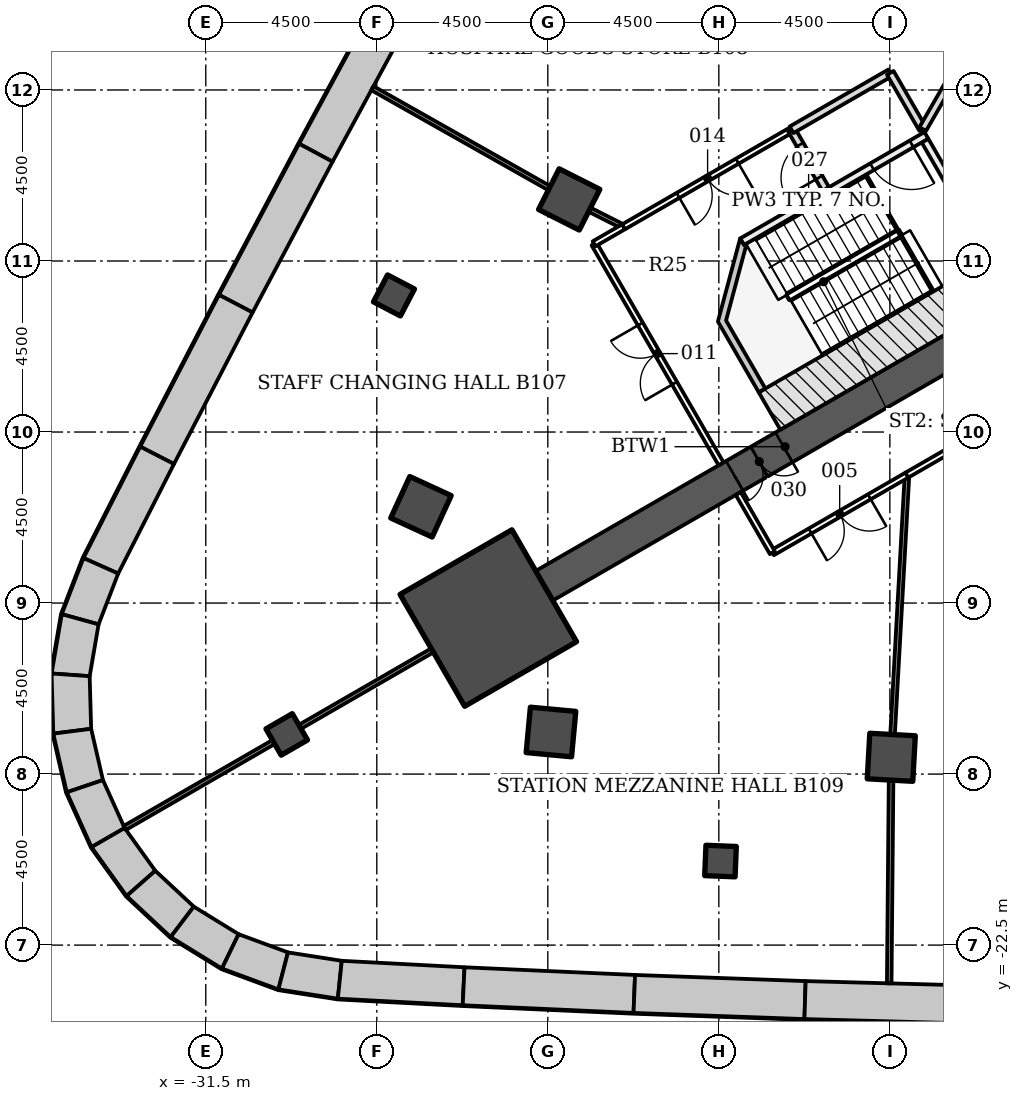
"""IFC4 building model, lengths in metres.
Left out: names, types, materials, properties, quantities, classifications, styles, units other than length and angle.
Written with IfcOpenShell. Run it as: python <this file> out.ifc"""

import sys

from ifc_helpers import new_model, si_unit, direction, frame, frame_2d, origin, origin_2d, place, context, subcontext, project, spatial, polyline, rectangle, outline, extrude, element, fill, save


model = new_model("IFC4")
c1 = context("Model", 3, precision=1e-05, world=origin(), true_north=direction((0.0, 1.0)))
c2 = subcontext(c1, "Body", "Model", "MODEL_VIEW")
j1 = project(units=[si_unit("LENGTHUNIT", "METRE"), si_unit("PLANEANGLEUNIT", "RADIAN")], contexts=[c1])
p1 = place(None, origin())
s1 = spatial("IfcSite", under=j1, at=p1, CompositionType="ELEMENT")
p2 = place(p1, origin())
s2 = spatial("IfcBuilding", under=s1, at=p2, CompositionType="ELEMENT")
p3 = place(p2, frame((0.0, 0.0, -4.5)))
s3 = spatial("IfcBuildingStorey", under=s2, at=p3, CompositionType="ELEMENT", Elevation=-4.5)
p4 = place(p3, origin())
e1 = element("IfcWall", 1, at=p4, inside=s3, PredefinedType="SOLIDWALL", context=c2, shape_type="SweptSolid", body=[
    extrude(outline(polyline([(-26.901, 2.542), (-29.045, -1.415), (-28.164, -1.887), (-26.024, 2.062), (-26.901, 2.542)])), origin(), (0.0, 0.0, 1.0), 4.25),
])
p5 = place(p3, origin())
e2 = element("IfcWall", 2, at=p5, inside=s3, PredefinedType="SOLIDWALL", context=c2, shape_type="SweptSolid", body=[
    extrude(outline(polyline([(-29.045, -1.415), (-31.153, -5.39), (-30.268, -5.854), (-28.164, -1.887), (-29.045, -1.415)])), origin(), (0.0, 0.0, 1.0), 4.25),
])
p6 = place(p3, origin())
e3 = element("IfcWall", 3, at=p6, inside=s3, PredefinedType="SOLIDWALL", context=c2, shape_type="SweptSolid", body=[
    extrude(outline(polyline([(-31.153, -5.39), (-33.226, -9.384), (-32.337, -9.841), (-30.268, -5.854), (-31.153, -5.39)])), origin(), (0.0, 0.0, 1.0), 4.25),
])
p7 = place(p3, origin())
e4 = element("IfcWall", 4, at=p7, inside=s3, PredefinedType="SOLIDWALL", context=c2, shape_type="SweptSolid", body=[
    extrude(outline(polyline([(-33.226, -9.384), (-34.719, -12.316), (-33.804, -12.724), (-32.337, -9.841), (-33.226, -9.384)])), origin(), (0.0, 0.0, 1.0), 4.25),
])
p8 = place(p3, origin())
e5 = element("IfcWall", 5, at=p8, inside=s3, PredefinedType="SOLIDWALL", context=c2, shape_type="SweptSolid", body=[
    extrude(outline(polyline([(-34.719, -12.316), (-35.289, -13.793), (-34.32, -14.06), (-33.804, -12.724), (-34.719, -12.316)])), origin(), (0.0, 0.0, 1.0), 4.25),
])
p9 = place(p3, origin())
e6 = element("IfcWall", 6, at=p9, inside=s3, PredefinedType="SOLIDWALL", context=c2, shape_type="SweptSolid", body=[
    extrude(outline(polyline([(-35.289, -13.793), (-35.557, -15.353), (-34.555, -15.425), (-34.32, -14.06), (-35.289, -13.793)])), origin(), (0.0, 0.0, 1.0), 4.25),
])
p10 = place(p3, origin())
e7 = element("IfcWall", 7, at=p10, inside=s3, PredefinedType="SOLIDWALL", context=c2, shape_type="SweptSolid", body=[
    extrude(outline(polyline([(-35.557, -15.353), (-35.513, -16.936), (-34.516, -16.809), (-34.555, -15.425), (-35.557, -15.353)])), origin(), (0.0, 0.0, 1.0), 4.25),
])
p11 = place(p3, origin())
e8 = element("IfcWall", 8, at=p11, inside=s3, PredefinedType="SOLIDWALL", context=c2, shape_type="SweptSolid", body=[
    extrude(outline(polyline([(-35.513, -16.936), (-35.158, -18.479), (-34.205, -18.158), (-34.516, -16.809), (-35.513, -16.936)])), origin(), (0.0, 0.0, 1.0), 4.25),
])
p12 = place(p3, origin())
e9 = element("IfcWall", 9, at=p12, inside=s3, PredefinedType="SOLIDWALL", context=c2, shape_type="SweptSolid", body=[
    extrude(outline(polyline([(-35.158, -18.479), (-34.506, -19.922), (-33.635, -19.419), (-34.205, -18.158), (-35.158, -18.479)])), origin(), (0.0, 0.0, 1.0), 4.25),
])
p13 = place(p3, origin())
e10 = element("IfcWall", 10, at=p13, inside=s3, PredefinedType="SOLIDWALL", context=c2, shape_type="SweptSolid", body=[
    extrude(outline(polyline([(-34.506, -19.922), (-33.582, -21.208), (-32.828, -20.544), (-33.635, -19.419), (-34.506, -19.922)])), origin(), (0.0, 0.0, 1.0), 4.25),
])
p14 = place(p3, origin())
e11 = element("IfcWall", 11, at=p14, inside=s3, PredefinedType="SOLIDWALL", context=c2, shape_type="SweptSolid", body=[
    extrude(outline(polyline([(-33.582, -21.208), (-32.423, -22.287), (-31.815, -21.487), (-32.828, -20.544), (-33.582, -21.208)])), origin(), (0.0, 0.0, 1.0), 4.25),
])
p15 = place(p3, origin())
e12 = element("IfcWall", 12, at=p15, inside=s3, PredefinedType="SOLIDWALL", context=c2, shape_type="SweptSolid", body=[
    extrude(outline(polyline([(-32.423, -22.287), (-31.075, -23.117), (-30.635, -22.213), (-31.815, -21.487), (-32.423, -22.287)])), origin(), (0.0, 0.0, 1.0), 4.25),
])
p16 = place(p3, origin())
e13 = element("IfcWall", 13, at=p16, inside=s3, PredefinedType="SOLIDWALL", context=c2, shape_type="SweptSolid", body=[
    extrude(outline(polyline([(-31.075, -23.117), (-29.589, -23.665), (-29.337, -22.692), (-30.635, -22.213), (-31.075, -23.117)])), origin(), (0.0, 0.0, 1.0), 4.25),
])
p17 = place(p3, origin())
e14 = element("IfcWall", 14, at=p17, inside=s3, PredefinedType="SOLIDWALL", context=c2, shape_type="SweptSolid", body=[
    extrude(outline(polyline([(-29.589, -23.665), (-28.025, -23.909), (-27.921, -22.913), (-29.337, -22.692), (-29.589, -23.665)])), origin(), (0.0, 0.0, 1.0), 4.25),
])
p18 = place(p3, origin())
e15 = element("IfcWall", 15, at=p18, inside=s3, PredefinedType="SOLIDWALL", context=c2, shape_type="SweptSolid", body=[
    extrude(outline(polyline([(-28.025, -23.909), (-24.74, -24.083), (-24.691, -23.084), (-27.921, -22.913), (-28.025, -23.909)])), origin(), (0.0, 0.0, 1.0), 4.25),
])
p19 = place(p3, origin())
e16 = element("IfcWall", 16, at=p19, inside=s3, PredefinedType="SOLIDWALL", context=c2, shape_type="SweptSolid", body=[
    extrude(outline(polyline([(-24.74, -24.083), (-20.244, -24.285), (-20.204, -23.285), (-24.691, -23.084), (-24.74, -24.083)])), origin(), (0.0, 0.0, 1.0), 4.25),
])
p20 = place(p3, origin())
e17 = element("IfcWall", 17, at=p20, inside=s3, PredefinedType="SOLIDWALL", context=c2, shape_type="SweptSolid", body=[
    extrude(outline(polyline([(-20.244, -24.285), (-15.747, -24.446), (-15.716, -23.447), (-20.204, -23.285), (-20.244, -24.285)])), origin(), (0.0, 0.0, 1.0), 4.25),
])
p21 = place(p3, origin())
e18 = element("IfcWall", 18, at=p21, inside=s3, PredefinedType="SOLIDWALL", context=c2, shape_type="SweptSolid", body=[
    extrude(outline(polyline([(-15.747, -24.446), (-11.249, -24.568), (-11.227, -23.568), (-15.716, -23.447), (-15.747, -24.446)])), origin(), (0.0, 0.0, 1.0), 4.25),
])
for number, where, z_axis, x_axis in (
    (19, (-21.937, -2.88, -0.3), (0.0, 0.0, 1.0), (-0.893, 0.451, 0.0)),
    (20, (-25.838, -10.967, -0.3), (0.0, 0.0, 1.0), (-0.909, 0.418, 0.0)),
    (21, (-22.417, -16.893, -0.3), (0.0, 0.0, 1.0), (-0.093, -0.996, 0.0)),
    (22, (-13.462, -17.558, -0.3), (0.0, 0.0, 1.0), (-0.056, -0.998, 0.0)),
):
    element("IfcColumn", number, at=place(p3, frame(where, z_axis=z_axis, x_axis=x_axis)), inside=s3, PredefinedType="COLUMN", context=c2, shape_type="SweptSolid", body=[
        extrude(rectangle(XDim=1.2, YDim=1.2, at=origin_2d()), origin(), (0.0, 0.0, 1.0), 4.55),
    ])
for number, where, z_axis, x_axis in (
    (23, (-26.548, -5.406, -0.3), (0.0, 0.0, 1.0), (-0.886, 0.464, 0.0)),
    (24, (-29.37, -16.957, -0.3), (0.0, 0.0, 1.0), (-0.866, -0.5, 0.0)),
    (25, (-17.956, -20.288, -0.3), (0.0, 0.0, 1.0), (-0.041, -0.999, 0.0)),
):
    element("IfcColumn", number, at=place(p3, frame(where, z_axis=z_axis, x_axis=x_axis)), inside=s3, PredefinedType="COLUMN", context=c2, shape_type="SweptSolid", body=[
        extrude(rectangle(XDim=0.8, YDim=0.8, at=origin_2d()), origin(), (0.0, 0.0, 1.0), 4.55),
    ])
p22 = place(p3, frame((-9.922, -5.728, -0.3), z_axis=(0.0, 0.0, 1.0), x_axis=(-0.866028046028, -0.499995423472, 0.0)))
e26 = element("IfcWall", 26, at=p22, inside=s3, PredefinedType="SHEAR", context=c2, shape_type="SweptSolid", body=[
    extrude(rectangle(XDim=14.633, YDim=0.9, at=frame_2d((7.316, 0.0))), origin(), (0.0, 0.0, 1.0), 4.55),
])
p23 = place(p22, frame((7.35, 0.0, 0.3)))
e27 = element("IfcOpeningElement", 27, at=p23, cuts=e26, PredefinedType="OPENING", context=c2, shape_type="SweptSolid", body=[
    extrude(rectangle(XDim=1.5, YDim=2.1, at=frame_2d((0.75, 1.05))), frame((0.0, 0.46, 0.0), z_axis=(0.0, -1.0, 0.0), x_axis=(1.0, 0.0, 0.0)), (0.0, 0.0, 1.0), 0.92),
])
p24 = place(p3, frame((-24.066, -13.895, -0.3), z_axis=(0.0, 0.0, 1.0), x_axis=(-0.866025403784, -0.5, 0.0)))
e28 = element("IfcColumn", 28, at=p24, inside=s3, PredefinedType="COLUMN", context=c2, shape_type="SweptSolid", body=[
    extrude(rectangle(XDim=3.4, YDim=3.4, at=origin_2d()), origin(), (0.0, 0.0, 1.0), 4.55),
])
p25 = place(p3, frame((-12.576, -1.331, -0.3), z_axis=(0.0, 0.0, 1.0), x_axis=(0.499970499736, -0.8660424351, 0.0)))
e29 = element("IfcWall", 29, at=p25, inside=s3, PredefinedType="SHEAR", context=c2, shape_type="SweptSolid", body=[
    extrude(rectangle(XDim=3.55, YDim=0.2, at=frame_2d((1.775, 0.0))), origin(), (0.0, 0.0, 1.0), 4.55),
])
p26 = place(p25, frame((1.175, 0.0, 0.3)))
e30 = element("IfcOpeningElement", 30, at=p26, cuts=e29, PredefinedType="OPENING", context=c2, shape_type="SweptSolid", body=[
    extrude(rectangle(XDim=1.2, YDim=2.1, at=frame_2d((0.6, 1.05))), frame((0.0, 0.11, 0.0), z_axis=(0.0, -1.0, 0.0), x_axis=(1.0, 0.0, 0.0)), (0.0, 0.0, 1.0), 0.22),
])
p27 = place(p3, frame((-12.539, -1.194, -0.3), z_axis=(0.0, 0.0, 1.0), x_axis=(-0.866045472092, -0.499965239061, 0.0)))
e31 = element("IfcWall", 31, at=p27, inside=s3, PredefinedType="SHEAR", context=c2, shape_type="SweptSolid", body=[
    extrude(rectangle(XDim=5.6, YDim=0.2, at=frame_2d((2.8, 0.0))), origin(), (0.0, 0.0, 1.0), 4.55),
])
p28 = place(p27, frame((0.45, 0.0, 0.3)))
e32 = element("IfcOpeningElement", 32, at=p28, cuts=e31, PredefinedType="OPENING", context=c2, shape_type="SweptSolid", body=[
    extrude(rectangle(XDim=1.2, YDim=2.1, at=frame_2d((0.6, 1.05))), frame((0.0, 0.11, 0.0), z_axis=(0.0, -1.0, 0.0), x_axis=(1.0, 0.0, 0.0)), (0.0, 0.0, 1.0), 0.22),
])
p29 = place(p3, frame((-10.43, -4.847, -0.3), z_axis=(0.0, 0.0, 1.0), x_axis=(-0.866018442252, -0.500012057535, 0.0)))
e33 = element("IfcWall", 33, at=p29, inside=s3, PredefinedType="SHEAR", context=c2, shape_type="SweptSolid", body=[
    extrude(rectangle(XDim=7.2, YDim=1.136, at=frame_2d((3.6, 0.0))), origin(), (0.0, 0.0, 1.0), 4.55),
])
p30 = place(p3, frame((0.0, 0.0, -0.3)))
e34 = element("IfcWall", 34, at=p30, inside=s3, PredefinedType="SHEAR", context=c2, shape_type="SweptSolid", body=[
    extrude(outline(polyline([(-17.439, -3.907), (-18.025, -6.093), (-16.95, -7.955), (-16.777, -7.855), (-17.81, -6.065), (-17.267, -4.039), (-17.339, -4.081), (-17.339, -4.081), (-17.339, -4.081), (-17.339, -4.081), (-17.339, -4.081), (-17.339, -4.081), (-17.339, -4.081), (-17.339, -4.081), (-17.339, -4.081), (-17.339, -4.081), (-17.339, -4.081), (-17.339, -4.081), (-17.339, -4.081), (-17.339, -4.081), (-17.339, -4.081), (-17.339, -4.081), (-17.339, -4.081), (-17.439, -3.907)])), origin(), (0.0, 0.0, 1.0), 4.55),
])
p31 = place(p3, frame((-13.517, -23.506, 0.0), z_axis=(0.0, 0.0, 1.0), x_axis=(0.00917685765, 0.999957891755, 0.0)))
e35 = element("IfcWall", 35, at=p31, inside=s3, PredefinedType="PARTITIONING", context=c2, shape_type="SweptSolid", body=[
    extrude(rectangle(XDim=5.347, YDim=0.12, at=frame_2d((2.674, 0.0))), origin(), (0.0, 0.0, 1.0), 3.633),
])
p32 = place(p3, frame((-13.429, -16.96, 0.0), z_axis=(0.0, 0.0, 1.0), x_axis=(0.055551088657, 0.998455846069, 0.0)))
e36 = element("IfcWall", 36, at=p32, inside=s3, PredefinedType="PARTITIONING", context=c2, shape_type="SweptSolid", body=[
    extrude(rectangle(XDim=6.838, YDim=0.12, at=frame_2d((3.419, 0.0))), origin(), (0.0, 0.0, 1.0), 3.638),
])
p33 = place(p3, frame((-13.045, -10.13, 0.0), z_axis=(0.0, 0.0, 1.0), x_axis=(-0.866035577775, -0.499982377718, 0.0)))
e37 = element("IfcWall", 37, at=p33, inside=s3, PredefinedType="PARTITIONING", context=c2, shape_type="SweptSolid", body=[
    extrude(rectangle(XDim=4.093, YDim=0.15, at=frame_2d((2.046, 0.0))), origin(), (0.0, 0.0, 1.0), 3.638),
])
p34 = place(p33, frame((1.15, 0.0, 0.0)))
e38 = element("IfcOpeningElement", 38, at=p34, cuts=e37, PredefinedType="OPENING", context=c2, shape_type="SweptSolid", body=[
    extrude(rectangle(XDim=1.8, YDim=2.1, at=frame_2d((0.9, 1.05))), frame((0.0, 0.085, 0.0), z_axis=(0.0, -1.0, 0.0), x_axis=(1.0, 0.0, 0.0)), (0.0, 0.0, 1.0), 0.17),
])
p35 = place(p3, frame((-16.591, -12.176, 0.0), z_axis=(0.0, 0.0, 1.0), x_axis=(-0.499965372359, 0.866045395139, 0.0)))
e39 = element("IfcWall", 39, at=p35, inside=s3, PredefinedType="PARTITIONING", context=c2, shape_type="SweptSolid", body=[
    extrude(rectangle(XDim=1.798, YDim=0.15, at=frame_2d((0.899, 0.0))), origin(), (0.0, 0.0, 1.0), 3.638),
])
p36 = place(p3, frame((-29.716, -17.157, 0.0), z_axis=(0.0, 0.0, 1.0), x_axis=(-0.866032814021, -0.499987164874, 0.0)))
e40 = element("IfcWall", 40, at=p36, inside=s3, PredefinedType="PARTITIONING", context=c2, shape_type="SweptSolid", body=[
    extrude(rectangle(XDim=4.524, YDim=0.12, at=frame_2d((2.262, 0.0))), origin(), (0.0, 0.0, 1.0), 4.25),
])
p37 = place(p3, frame((-25.538, -14.745, 0.0), z_axis=(0.0, 0.0, 1.0), x_axis=(-0.866027971625, -0.499995552344, 0.0)))
e41 = element("IfcWall", 41, at=p37, inside=s3, PredefinedType="PARTITIONING", context=c2, shape_type="SweptSolid", body=[
    extrude(rectangle(XDim=4.024, YDim=0.12, at=frame_2d((2.012, 0.0))), origin(), (0.0, 0.0, 1.0), 3.717),
])
p38 = place(p3, frame((-11.828, -9.427, 0.0), z_axis=(0.0, 0.0, 1.0), x_axis=(-0.866110865696, -0.499851946404, 0.0)))
e42 = element("IfcWall", 42, at=p38, inside=s3, PredefinedType="PARTITIONING", context=c2, shape_type="SweptSolid", body=[
    extrude(rectangle(XDim=1.415, YDim=0.15, at=frame_2d((0.707, 0.0))), origin(), (0.0, 0.0, 1.0), 3.638),
])
p39 = place(p3, frame((-17.941, -9.838, 0.0), z_axis=(0.0, 0.0, 1.0), x_axis=(-0.500048140185, 0.865997608252, 0.0)))
e43 = element("IfcWall", 43, at=p39, inside=s3, PredefinedType="PARTITIONING", context=c2, shape_type="SweptSolid", body=[
    extrude(rectangle(XDim=6.683, YDim=0.15, at=frame_2d((3.342, 0.0))), origin(), (0.0, 0.0, 1.0), 3.638),
])
p40 = place(p39, frame((2.45, 0.0, 0.0)))
e44 = element("IfcOpeningElement", 44, at=p40, cuts=e43, PredefinedType="OPENING", context=c2, shape_type="SweptSolid", body=[
    extrude(rectangle(XDim=1.8, YDim=2.1, at=frame_2d((0.9, 1.05))), frame((0.0, 0.085, 0.0), z_axis=(0.0, -1.0, 0.0), x_axis=(1.0, 0.0, 0.0)), (0.0, 0.0, 1.0), 0.17),
])
p41 = place(p3, frame((-21.283, -4.048, 0.0), z_axis=(0.0, 0.0, 1.0), x_axis=(0.865804825377, 0.500381858538, 0.0)))
e45 = element("IfcWall", 45, at=p41, inside=s3, PredefinedType="PARTITIONING", context=c2, shape_type="SweptSolid", body=[
    extrude(rectangle(XDim=0.897, YDim=0.15, at=frame_2d((0.449, 0.0))), origin(), (0.0, 0.0, 1.0), 3.638),
])
p42 = place(p3, frame((-22.461, -2.584, 0.0), z_axis=(0.0, 0.0, 1.0), x_axis=(-0.87056283872, 0.492057256668, 0.0)))
e46 = element("IfcWall", 46, at=p42, inside=s3, PredefinedType="PARTITIONING", context=c2, shape_type="SweptSolid", body=[
    extrude(rectangle(XDim=5.347, YDim=0.12, at=frame_2d((2.674, 0.0))), origin(), (0.0, 0.0, 1.0), 3.633),
])
p43 = place(p3, frame((-20.509, -3.601, 0.0), z_axis=(0.0, 0.0, 1.0), x_axis=(-0.892316605155, 0.451410097544, 0.0)))
e47 = element("IfcWall", 47, at=p43, inside=s3, PredefinedType="PARTITIONING", context=c2, shape_type="SweptSolid", body=[
    extrude(rectangle(XDim=1.0, YDim=0.12, at=frame_2d((0.5, 0.0))), origin(), (0.0, 0.0, 1.0), 3.638),
])
p44 = place(p3, frame((-16.087, -1.049, 0.0), z_axis=(0.0, 0.0, 1.0), x_axis=(-0.866071706002, -0.49991979363, 0.0)))
e48 = element("IfcWall", 48, at=p44, inside=s3, PredefinedType="PARTITIONING", context=c2, shape_type="SweptSolid", body=[
    extrude(rectangle(XDim=5.105, YDim=0.15, at=frame_2d((2.552, 0.0))), origin(), (0.0, 0.0, 1.0), 3.638),
])
p45 = place(p44, frame((1.65, 0.0, 0.0)))
e49 = element("IfcOpeningElement", 49, at=p45, cuts=e48, PredefinedType="OPENING", context=c2, shape_type="SweptSolid", body=[
    extrude(rectangle(XDim=1.8, YDim=2.1, at=frame_2d((0.9, 1.05))), frame((0.0, 0.085, 0.0), z_axis=(0.0, -1.0, 0.0), x_axis=(1.0, 0.0, 0.0)), (0.0, 0.0, 1.0), 0.17),
])
p46 = place(p3, frame((-15.188, -2.607, 0.0), z_axis=(0.0, 0.0, 1.0), x_axis=(-0.500024172624, 0.866011447264, 0.0)))
e50 = element("IfcWall", 50, at=p46, inside=s3, PredefinedType="PARTITIONING", context=c2, shape_type="SweptSolid", body=[
    extrude(rectangle(XDim=1.798, YDim=0.2, at=frame_2d((0.899, 0.0))), origin(), (0.0, 0.0, 1.0), 3.638),
])
p47 = place(p46, frame((0.35, 0.0, 0.0)))
e51 = element("IfcOpeningElement", 51, at=p47, cuts=e50, PredefinedType="OPENING", context=c2, shape_type="SweptSolid", body=[
    extrude(rectangle(XDim=1.0, YDim=2.1, at=frame_2d((0.5, 1.05))), frame((0.0, 0.11, 0.0), z_axis=(0.0, -1.0, 0.0), x_axis=(1.0, 0.0, 0.0)), (0.0, 0.0, 1.0), 0.22),
])
p48 = place(p3, frame((-16.087, -1.048, 0.0), z_axis=(0.0, 0.0, 1.0), x_axis=(0.865988915629, 0.500063194015, 0.0)))
e52 = element("IfcWall", 52, at=p48, inside=s3, PredefinedType="PARTITIONING", context=c2, shape_type="SweptSolid", body=[
    extrude(rectangle(XDim=2.998, YDim=0.2, at=frame_2d((1.499, 0.0))), origin(), (0.0, 0.0, 1.0), 3.638),
])
p49 = place(p3, frame((-13.489, 0.451, 0.0), z_axis=(0.0, 0.0, 1.0), x_axis=(0.500044178772, -0.865999895656, 0.0)))
e53 = element("IfcWall", 53, at=p49, inside=s3, PredefinedType="PARTITIONING", context=c2, shape_type="SweptSolid", body=[
    extrude(rectangle(XDim=1.708, YDim=0.2, at=frame_2d((0.854, 0.0))), origin(), (0.0, 0.0, 1.0), 4.25),
])
p50 = place(p3, frame((-12.635, -1.028, 0.0), z_axis=(0.0, 0.0, 1.0), x_axis=(0.50005725472, 0.865992345233, 0.0)))
e54 = element("IfcWall", 54, at=p50, inside=s3, PredefinedType="PARTITIONING", context=c2, shape_type="SweptSolid", body=[
    extrude(rectangle(XDim=2.862, YDim=0.2, at=frame_2d((1.431, 0.0))), origin(), (0.0, 0.0, 1.0), 3.638),
])
p51 = place(p28, origin())
e55 = element("IfcDoor", 55, at=p51, inside=s3, OperationType="SINGLE_SWING_LEFT", PredefinedType="DOOR", context=c2, shape_type="SweptSolid", body=[
    extrude(rectangle(XDim=1.2, YDim=2.1, at=frame_2d((0.6, 1.05))), frame((0.0, 0.025, 0.0), z_axis=(0.0, -1.0, 0.0), x_axis=(1.0, 0.0, 0.0)), (0.0, 0.0, 1.0), 0.05),
])
fill(e32, e55)
p52 = place(p34, origin())
e56 = element("IfcDoor", 56, at=p52, inside=s3, OperationType="DOUBLE_DOOR_SINGLE_SWING", PredefinedType="DOOR", context=c2, shape_type="SweptSolid", body=[
    extrude(rectangle(XDim=1.8, YDim=2.1, at=frame_2d((0.9, 1.05))), frame((0.0, 0.025, 0.0), z_axis=(0.0, -1.0, 0.0), x_axis=(1.0, 0.0, 0.0)), (0.0, 0.0, 1.0), 0.05),
])
fill(e38, e56)
p53 = place(p40, origin())
e57 = element("IfcDoor", 57, at=p53, inside=s3, OperationType="DOUBLE_DOOR_SINGLE_SWING", PredefinedType="DOOR", context=c2, shape_type="SweptSolid", body=[
    extrude(rectangle(XDim=1.8, YDim=2.1, at=frame_2d((0.9, 1.05))), frame((0.0, 0.025, 0.0), z_axis=(0.0, -1.0, 0.0), x_axis=(1.0, 0.0, 0.0)), (0.0, 0.0, 1.0), 0.05),
])
fill(e44, e57)
p54 = place(p45, origin())
e58 = element("IfcDoor", 58, at=p54, inside=s3, OperationType="DOUBLE_DOOR_SINGLE_SWING", PredefinedType="DOOR", context=c2, shape_type="SweptSolid", body=[
    extrude(rectangle(XDim=1.8, YDim=2.1, at=frame_2d((0.9, 1.05))), frame((0.0, 0.025, 0.0), z_axis=(0.0, -1.0, 0.0), x_axis=(1.0, 0.0, 0.0)), (0.0, 0.0, 1.0), 0.05),
])
fill(e49, e58)
p55 = place(p47, origin())
e59 = element("IfcDoor", 59, at=p55, inside=s3, OperationType="SINGLE_SWING_LEFT", PredefinedType="DOOR", context=c2, shape_type="SweptSolid", body=[
    extrude(rectangle(XDim=1.0, YDim=2.1, at=frame_2d((0.5, 1.05))), frame((0.0, 0.025, 0.0), z_axis=(0.0, -1.0, 0.0), x_axis=(1.0, 0.0, 0.0)), (0.0, 0.0, 1.0), 0.05),
])
fill(e51, e59)
p56 = place(p23, origin())
e60 = element("IfcDoor", 60, at=p56, inside=s3, OperationType="DOUBLE_DOOR_SINGLE_SWING", PredefinedType="DOOR", context=c2, shape_type="SweptSolid", body=[
    extrude(rectangle(XDim=1.5, YDim=2.1, at=frame_2d((0.75, 1.05))), frame((0.0, 0.025, 0.0), z_axis=(0.0, -1.0, 0.0), x_axis=(1.0, 0.0, 0.0)), (0.0, 0.0, 1.0), 0.05),
])
fill(e27, e60)
save(model, sys.argv[1])
